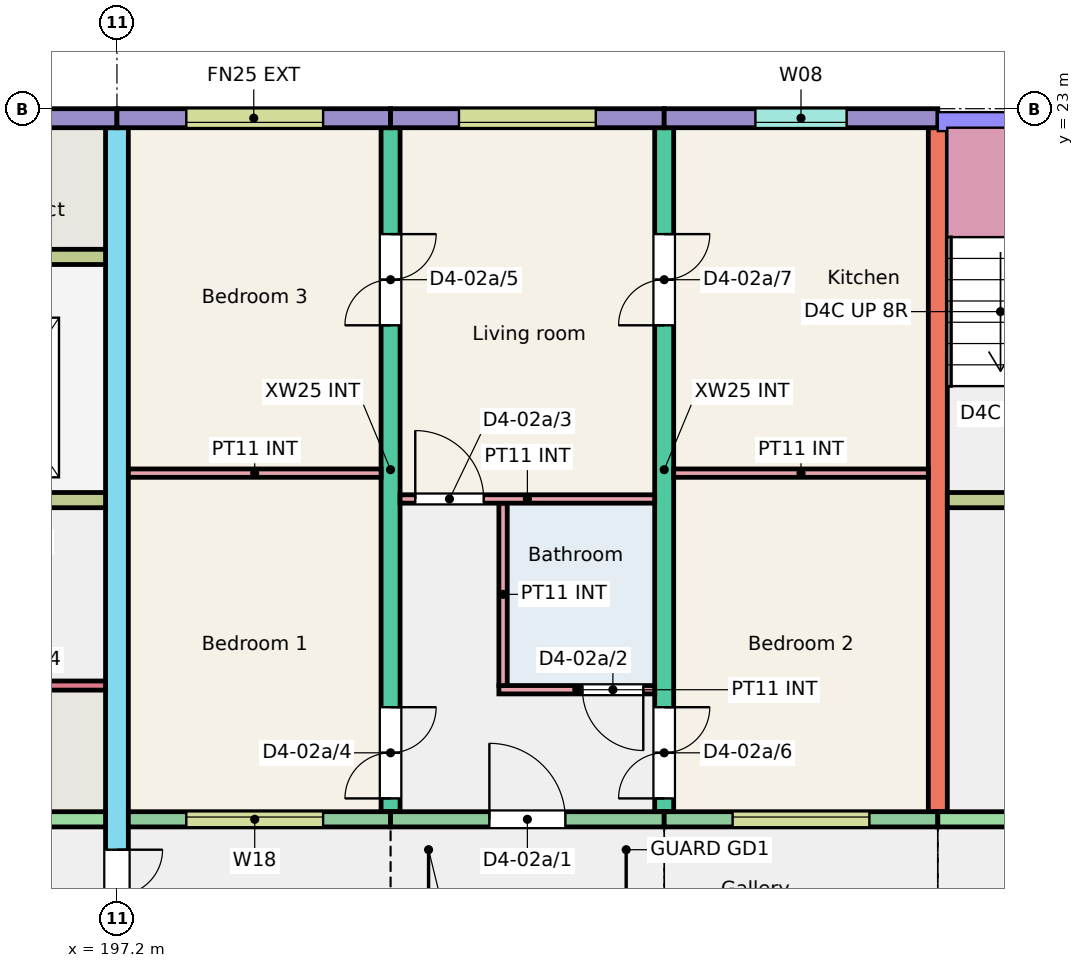
"""IFC4 building model, lengths in metres.
Left out: names, types, materials, properties, quantities, classifications, styles, units other than length and angle.
Written with IfcOpenShell. Run it as: python <this file> out.ifc"""

import sys

from ifc_helpers import new_model, si_unit, direction, frame, frame_2d, origin, place, context, subcontext, project, spatial, rectangle, extrude, element, fill, save


model = new_model("IFC4")
c1 = context("Model", 3, precision=1e-05, world=origin(), true_north=direction((0.0, 1.0)))
c2 = subcontext(c1, "Body", "Model", "MODEL_VIEW")
j1 = project(units=[si_unit("LENGTHUNIT", "METRE"), si_unit("PLANEANGLEUNIT", "RADIAN")], contexts=[c1])
p1 = place(None, origin())
s1 = spatial("IfcSite", under=j1, at=p1, CompositionType="ELEMENT")
p2 = place(p1, origin())
s2 = spatial("IfcBuilding", under=s1, at=p2, CompositionType="ELEMENT")
p3 = place(p2, frame((0.0, 0.0, 6.0)))
s3 = spatial("IfcBuildingStorey", under=s2, at=p3, CompositionType="ELEMENT", Elevation=6.0)
p4 = place(p3, frame((197.2, 11.75, 0.0), z_axis=(0.0, 0.0, 1.0), x_axis=(0.0, 1.0, 0.0)))
e1 = element("IfcWall", 1, at=p4, inside=s3, PredefinedType="SHEAR", context=c2, shape_type="SweptSolid", body=[
    extrude(rectangle(XDim=11.0, YDim=0.3, at=frame_2d((5.5, 0.0))), origin(), (0.0, 0.0, 1.0), 3.0),
])
p5 = place(p4, frame((0.3, 0.0, 0.0)))
e2 = element("IfcOpeningElement", 2, at=p5, cuts=e1, PredefinedType="OPENING", context=c2, shape_type="SweptSolid", body=[
    extrude(rectangle(XDim=1.2, YDim=2.1, at=frame_2d((0.6, 1.05))), frame((0.0, 0.16, 0.0), z_axis=(0.0, -1.0, 0.0), x_axis=(1.0, 0.0, 0.0)), (0.0, 0.0, 1.0), 0.32),
])
p6 = place(p3, frame((200.8, 13.75, 0.0), z_axis=(0.0, 0.0, 1.0), x_axis=(0.0, 1.0, 0.0)))
e3 = element("IfcWall", 3, at=p6, inside=s3, PredefinedType="SHEAR", context=c2, shape_type="SweptSolid", body=[
    extrude(rectangle(XDim=9.0, YDim=0.25, at=frame_2d((4.5, 0.0))), origin(), (0.0, 0.0, 1.0), 3.0),
])
p7 = place(p6, frame((0.175, 0.0, 0.0)))
e4 = element("IfcOpeningElement", 4, at=p7, cuts=e3, PredefinedType="OPENING", context=c2, shape_type="SweptSolid", body=[
    extrude(rectangle(XDim=1.2, YDim=2.1, at=frame_2d((0.6, 1.05))), frame((0.0, 0.135, 0.0), z_axis=(0.0, -1.0, 0.0), x_axis=(1.0, 0.0, 0.0)), (0.0, 0.0, 1.0), 0.27),
])
p8 = place(p6, frame((6.4, 0.0, 0.0)))
e5 = element("IfcOpeningElement", 5, at=p8, cuts=e3, PredefinedType="OPENING", context=c2, shape_type="SweptSolid", body=[
    extrude(rectangle(XDim=1.2, YDim=2.1, at=frame_2d((0.6, 1.05))), frame((0.0, 0.135, 0.0), z_axis=(0.0, -1.0, 0.0), x_axis=(1.0, 0.0, 0.0)), (0.0, 0.0, 1.0), 0.27),
])
p9 = place(p3, frame((204.4, 13.75, 0.0), z_axis=(0.0, 0.0, 1.0), x_axis=(0.0, 1.0, 0.0)))
e6 = element("IfcWall", 6, at=p9, inside=s3, PredefinedType="SHEAR", context=c2, shape_type="SweptSolid", body=[
    extrude(rectangle(XDim=9.0, YDim=0.25, at=frame_2d((4.5, 0.0))), origin(), (0.0, 0.0, 1.0), 3.0),
])
p10 = place(p9, frame((0.175, 0.0, 0.0)))
e7 = element("IfcOpeningElement", 7, at=p10, cuts=e6, PredefinedType="OPENING", context=c2, shape_type="SweptSolid", body=[
    extrude(rectangle(XDim=1.2, YDim=2.1, at=frame_2d((0.6, 1.05))), frame((0.0, 0.135, 0.0), z_axis=(0.0, -1.0, 0.0), x_axis=(1.0, 0.0, 0.0)), (0.0, 0.0, 1.0), 0.27),
])
p11 = place(p9, frame((6.4, 0.0, 0.0)))
e8 = element("IfcOpeningElement", 8, at=p11, cuts=e6, PredefinedType="OPENING", context=c2, shape_type="SweptSolid", body=[
    extrude(rectangle(XDim=1.2, YDim=2.1, at=frame_2d((0.6, 1.05))), frame((0.0, 0.135, 0.0), z_axis=(0.0, -1.0, 0.0), x_axis=(1.0, 0.0, 0.0)), (0.0, 0.0, 1.0), 0.27),
])
p12 = place(p3, frame((208.0, 13.75, 0.0), z_axis=(0.0, 0.0, 1.0), x_axis=(0.0, 1.0, 0.0)))
e9 = element("IfcWall", 9, at=p12, inside=s3, PredefinedType="SHEAR", context=c2, shape_type="SweptSolid", body=[
    extrude(rectangle(XDim=9.0, YDim=0.25, at=frame_2d((4.5, 0.0))), origin(), (0.0, 0.0, 1.0), 3.0),
])
p13 = place(p3, frame((194.225, 22.875, 0.0), z_axis=(0.0, 0.0, 1.0), x_axis=(1.0, 0.0, 0.0)))
e10 = element("IfcWall", 10, at=p13, inside=s3, PredefinedType="SOLIDWALL", context=c2, shape_type="SweptSolid", body=[
    extrude(rectangle(XDim=2.975, YDim=0.25, at=frame_2d((1.487, 0.0))), origin(), (0.0, 0.0, 1.0), 3.0),
])
p14 = place(p3, frame((191.2, 13.65, 0.0), z_axis=(0.0, 0.0, 1.0), x_axis=(1.0, 0.0, 0.0)))
e11 = element("IfcWall", 11, at=p14, inside=s3, PredefinedType="SHEAR", context=c2, shape_type="SweptSolid", body=[
    extrude(rectangle(XDim=5.85, YDim=0.2, at=frame_2d((2.925, 0.0))), origin(), (0.0, 0.0, 1.0), 3.0),
])
p15 = place(p14, frame((2.438, 0.0, 0.0)))
e12 = element("IfcOpeningElement", 12, at=p15, cuts=e11, PredefinedType="OPENING", context=c2, shape_type="SweptSolid", body=[
    extrude(rectangle(XDim=1.1, YDim=2.1, at=frame_2d((0.55, 1.05))), frame((0.0, 0.11, 0.0), z_axis=(0.0, -1.0, 0.0), x_axis=(1.0, 0.0, 0.0)), (0.0, 0.0, 1.0), 0.22),
])
p16 = place(p3, frame((191.325, 17.85, 0.0), z_axis=(0.0, 0.0, 1.0), x_axis=(1.0, 0.0, 0.0)))
e13 = element("IfcWall", 13, at=p16, inside=s3, PredefinedType="SHEAR", context=c2, shape_type="SweptSolid", body=[
    extrude(rectangle(XDim=5.725, YDim=0.2, at=frame_2d((2.863, 0.0))), origin(), (0.0, 0.0, 1.0), 3.0),
])
p17 = place(p16, frame((0.95, 0.0, 0.0)))
e14 = element("IfcOpeningElement", 14, at=p17, cuts=e13, PredefinedType="OPENING", context=c2, shape_type="SweptSolid", body=[
    extrude(rectangle(XDim=1.0, YDim=2.1, at=frame_2d((0.5, 1.05))), frame((0.0, 0.11, 0.0), z_axis=(0.0, -1.0, 0.0), x_axis=(1.0, 0.0, 0.0)), (0.0, 0.0, 1.0), 0.22),
])
p18 = place(p16, frame((3.863, 0.0, 0.0)))
e15 = element("IfcOpeningElement", 15, at=p18, cuts=e13, PredefinedType="OPENING", context=c2, shape_type="SweptSolid", body=[
    extrude(rectangle(XDim=1.1, YDim=2.1, at=frame_2d((0.55, 1.05))), frame((0.0, 0.11, 0.0), z_axis=(0.0, -1.0, 0.0), x_axis=(1.0, 0.0, 0.0)), (0.0, 0.0, 1.0), 0.22),
])
p19 = place(p3, frame((194.425, 21.05, 0.0), z_axis=(0.0, 0.0, 1.0), x_axis=(1.0, 0.0, 0.0)))
e16 = element("IfcWall", 16, at=p19, inside=s3, PredefinedType="SHEAR", context=c2, shape_type="SweptSolid", body=[
    extrude(rectangle(XDim=2.625, YDim=0.2, at=frame_2d((1.312, 0.0))), origin(), (0.0, 0.0, 1.0), 3.0),
])
p20 = place(p3, frame((195.92, 15.41, 0.0), z_axis=(0.0, 0.0, 1.0), x_axis=(1.0, 0.0, 0.0)))
e17 = element("IfcWall", 17, at=p20, inside=s3, PredefinedType="SHEAR", context=c2, shape_type="SweptSolid", body=[
    extrude(rectangle(XDim=1.13, YDim=0.12, at=frame_2d((0.565, 0.0))), origin(), (0.0, 0.0, 1.0), 3.0),
])
p21 = place(p3, frame((197.2, 22.875, 0.0), z_axis=(0.0, 0.0, 1.0), x_axis=(1.0, 0.0, 0.0)))
e18 = element("IfcWall", 18, at=p21, inside=s3, PredefinedType="SOLIDWALL", context=c2, shape_type="SweptSolid", body=[
    extrude(rectangle(XDim=3.6, YDim=0.25, at=frame_2d((1.8, 0.0))), origin(), (0.0, 0.0, 1.0), 3.0),
])
p22 = place(p21, frame((0.913, 0.0, 1.1)))
e19 = element("IfcOpeningElement", 19, at=p22, cuts=e18, PredefinedType="OPENING", context=c2, shape_type="SweptSolid", body=[
    extrude(rectangle(XDim=1.8, YDim=1.3, at=frame_2d((0.9, 0.65))), frame((0.0, 0.135, 0.0), z_axis=(0.0, -1.0, 0.0), x_axis=(1.0, 0.0, 0.0)), (0.0, 0.0, 1.0), 0.27),
])
p23 = place(p3, frame((197.35, 13.65, 0.0), z_axis=(0.0, 0.0, 1.0), x_axis=(1.0, 0.0, 0.0)))
e20 = element("IfcWall", 20, at=p23, inside=s3, PredefinedType="SOLIDWALL", context=c2, shape_type="SweptSolid", body=[
    extrude(rectangle(XDim=3.45, YDim=0.2, at=frame_2d((1.725, 0.0))), origin(), (0.0, 0.0, 1.0), 3.0),
])
p24 = place(p23, frame((0.762, 0.0, 1.1)))
e21 = element("IfcOpeningElement", 21, at=p24, cuts=e20, PredefinedType="OPENING", context=c2, shape_type="SweptSolid", body=[
    extrude(rectangle(XDim=1.8, YDim=1.3, at=frame_2d((0.9, 0.65))), frame((0.0, 0.11, 0.0), z_axis=(0.0, -1.0, 0.0), x_axis=(1.0, 0.0, 0.0)), (0.0, 0.0, 1.0), 0.22),
])
p25 = place(p3, frame((200.8, 22.875, 0.0), z_axis=(0.0, 0.0, 1.0), x_axis=(1.0, 0.0, 0.0)))
e22 = element("IfcWall", 22, at=p25, inside=s3, PredefinedType="SOLIDWALL", context=c2, shape_type="SweptSolid", body=[
    extrude(rectangle(XDim=3.6, YDim=0.25, at=frame_2d((1.8, 0.0))), origin(), (0.0, 0.0, 1.0), 3.0),
])
p26 = place(p25, frame((0.9, 0.0, 1.1)))
e23 = element("IfcOpeningElement", 23, at=p26, cuts=e22, PredefinedType="OPENING", context=c2, shape_type="SweptSolid", body=[
    extrude(rectangle(XDim=1.8, YDim=1.3, at=frame_2d((0.9, 0.65))), frame((0.0, 0.135, 0.0), z_axis=(0.0, -1.0, 0.0), x_axis=(1.0, 0.0, 0.0)), (0.0, 0.0, 1.0), 0.27),
])
p27 = place(p3, frame((200.8, 13.65, 0.0), z_axis=(0.0, 0.0, 1.0), x_axis=(1.0, 0.0, 0.0)))
e24 = element("IfcWall", 24, at=p27, inside=s3, PredefinedType="SOLIDWALL", context=c2, shape_type="SweptSolid", body=[
    extrude(rectangle(XDim=3.6, YDim=0.2, at=frame_2d((1.8, 0.0))), origin(), (0.0, 0.0, 1.0), 3.0),
])
p28 = place(p27, frame((1.3, 0.0, 0.0)))
e25 = element("IfcOpeningElement", 25, at=p28, cuts=e24, PredefinedType="OPENING", context=c2, shape_type="SweptSolid", body=[
    extrude(rectangle(XDim=1.0, YDim=2.1, at=frame_2d((0.5, 1.05))), frame((0.0, 0.11, 0.0), z_axis=(0.0, -1.0, 0.0), x_axis=(1.0, 0.0, 0.0)), (0.0, 0.0, 1.0), 0.22),
])
p29 = place(p3, frame((204.4, 22.875, 0.0), z_axis=(0.0, 0.0, 1.0), x_axis=(1.0, 0.0, 0.0)))
e26 = element("IfcWall", 26, at=p29, inside=s3, PredefinedType="SOLIDWALL", context=c2, shape_type="SweptSolid", body=[
    extrude(rectangle(XDim=3.6, YDim=0.25, at=frame_2d((1.8, 0.0))), origin(), (0.0, 0.0, 1.0), 3.0),
])
p30 = place(p29, frame((1.2, 0.0, 1.1)))
e27 = element("IfcOpeningElement", 27, at=p30, cuts=e26, PredefinedType="OPENING", context=c2, shape_type="SweptSolid", body=[
    extrude(rectangle(XDim=1.2, YDim=1.3, at=frame_2d((0.6, 0.65))), frame((0.0, 0.135, 0.0), z_axis=(0.0, -1.0, 0.0), x_axis=(1.0, 0.0, 0.0)), (0.0, 0.0, 1.0), 0.27),
])
p31 = place(p3, frame((204.4, 13.65, 0.0), z_axis=(0.0, 0.0, 1.0), x_axis=(1.0, 0.0, 0.0)))
e28 = element("IfcWall", 28, at=p31, inside=s3, PredefinedType="SOLIDWALL", context=c2, shape_type="SweptSolid", body=[
    extrude(rectangle(XDim=3.6, YDim=0.2, at=frame_2d((1.8, 0.0))), origin(), (0.0, 0.0, 1.0), 3.0),
])
p32 = place(p31, frame((0.9, 0.0, 1.1)))
e29 = element("IfcOpeningElement", 29, at=p32, cuts=e28, PredefinedType="OPENING", context=c2, shape_type="SweptSolid", body=[
    extrude(rectangle(XDim=1.8, YDim=1.3, at=frame_2d((0.9, 0.65))), frame((0.0, 0.11, 0.0), z_axis=(0.0, -1.0, 0.0), x_axis=(1.0, 0.0, 0.0)), (0.0, 0.0, 1.0), 0.22),
])
p33 = place(p3, frame((208.0, 13.65, 0.0), z_axis=(0.0, 0.0, 1.0), x_axis=(1.0, 0.0, 0.0)))
e30 = element("IfcWall", 30, at=p33, inside=s3, PredefinedType="SHEAR", context=c2, shape_type="SweptSolid", body=[
    extrude(rectangle(XDim=5.85, YDim=0.2, at=frame_2d((2.925, 0.0))), origin(), (0.0, 0.0, 1.0), 3.0),
])
p34 = place(p33, frame((2.438, 0.0, 0.0)))
e31 = element("IfcOpeningElement", 31, at=p34, cuts=e30, PredefinedType="OPENING", context=c2, shape_type="SweptSolid", body=[
    extrude(rectangle(XDim=1.1, YDim=2.1, at=frame_2d((0.55, 1.05))), frame((0.0, 0.11, 0.0), z_axis=(0.0, -1.0, 0.0), x_axis=(1.0, 0.0, 0.0)), (0.0, 0.0, 1.0), 0.22),
])
p35 = place(p3, frame((208.125, 17.85, 0.0), z_axis=(0.0, 0.0, 1.0), x_axis=(1.0, 0.0, 0.0)))
e32 = element("IfcWall", 32, at=p35, inside=s3, PredefinedType="SHEAR", context=c2, shape_type="SweptSolid", body=[
    extrude(rectangle(XDim=5.725, YDim=0.2, at=frame_2d((2.863, 0.0))), origin(), (0.0, 0.0, 1.0), 3.0),
])
p36 = place(p35, frame((0.95, 0.0, 0.0)))
e33 = element("IfcOpeningElement", 33, at=p36, cuts=e32, PredefinedType="OPENING", context=c2, shape_type="SweptSolid", body=[
    extrude(rectangle(XDim=1.0, YDim=2.1, at=frame_2d((0.5, 1.05))), frame((0.0, 0.11, 0.0), z_axis=(0.0, -1.0, 0.0), x_axis=(1.0, 0.0, 0.0)), (0.0, 0.0, 1.0), 0.22),
])
p37 = place(p35, frame((3.863, 0.0, 0.0)))
e34 = element("IfcOpeningElement", 34, at=p37, cuts=e32, PredefinedType="OPENING", context=c2, shape_type="SweptSolid", body=[
    extrude(rectangle(XDim=1.1, YDim=2.1, at=frame_2d((0.55, 1.05))), frame((0.0, 0.11, 0.0), z_axis=(0.0, -1.0, 0.0), x_axis=(1.0, 0.0, 0.0)), (0.0, 0.0, 1.0), 0.22),
])
p38 = place(p3, frame((202.225, 15.355, 0.0), z_axis=(0.0, 0.0, 1.0), x_axis=(1.0, 0.0, 0.0)))
e35 = element("IfcWall", 35, at=p38, inside=s3, PredefinedType="PARTITIONING", context=c2, shape_type="SweptSolid", body=[
    extrude(rectangle(XDim=2.05, YDim=0.11, at=frame_2d((1.025, 0.0))), origin(), (0.0, 0.0, 1.0), 2.8),
])
p39 = place(p38, frame((1.1, 0.0, 0.0)))
e36 = element("IfcOpeningElement", 36, at=p39, cuts=e35, PredefinedType="OPENING", context=c2, shape_type="SweptSolid", body=[
    extrude(rectangle(XDim=0.8, YDim=2.1, at=frame_2d((0.4, 1.05))), frame((0.0, 0.065, 0.0), z_axis=(0.0, -1.0, 0.0), x_axis=(1.0, 0.0, 0.0)), (0.0, 0.0, 1.0), 0.13),
])
p40 = place(p3, frame((202.28, 15.41, 0.0), z_axis=(0.0, 0.0, 1.0), x_axis=(0.0, 1.0, 0.0)))
e37 = element("IfcWall", 37, at=p40, inside=s3, PredefinedType="PARTITIONING", context=c2, shape_type="SweptSolid", body=[
    extrude(rectangle(XDim=2.4, YDim=0.11, at=frame_2d((1.2, 0.0))), origin(), (0.0, 0.0, 1.0), 2.8),
])
p41 = place(p3, frame((200.925, 17.865, 0.0), z_axis=(0.0, 0.0, 1.0), x_axis=(1.0, 0.0, 0.0)))
e38 = element("IfcWall", 38, at=p41, inside=s3, PredefinedType="PARTITIONING", context=c2, shape_type="SweptSolid", body=[
    extrude(rectangle(XDim=3.35, YDim=0.11, at=frame_2d((1.675, 0.0))), origin(), (0.0, 0.0, 1.0), 2.8),
])
p42 = place(p41, frame((0.2, 0.0, 0.0)))
e39 = element("IfcOpeningElement", 39, at=p42, cuts=e38, PredefinedType="OPENING", context=c2, shape_type="SweptSolid", body=[
    extrude(rectangle(XDim=0.9, YDim=2.1, at=frame_2d((0.45, 1.05))), frame((0.0, 0.065, 0.0), z_axis=(0.0, -1.0, 0.0), x_axis=(1.0, 0.0, 0.0)), (0.0, 0.0, 1.0), 0.13),
])
p43 = place(p3, frame((197.35, 18.205, 0.0), z_axis=(0.0, 0.0, 1.0), x_axis=(1.0, 0.0, 0.0)))
e40 = element("IfcWall", 40, at=p43, inside=s3, PredefinedType="PARTITIONING", context=c2, shape_type="SweptSolid", body=[
    extrude(rectangle(XDim=3.325, YDim=0.11, at=frame_2d((1.663, 0.0))), origin(), (0.0, 0.0, 1.0), 2.8),
])
p44 = place(p3, frame((204.525, 18.205, 0.0), z_axis=(0.0, 0.0, 1.0), x_axis=(1.0, 0.0, 0.0)))
e41 = element("IfcWall", 41, at=p44, inside=s3, PredefinedType="PARTITIONING", context=c2, shape_type="SweptSolid", body=[
    extrude(rectangle(XDim=3.35, YDim=0.11, at=frame_2d((1.675, 0.0))), origin(), (0.0, 0.0, 1.0), 2.8),
])
p45 = place(p24, origin())
e42 = element("IfcWindow", 42, at=p45, inside=s3, PartitioningType="SINGLE_PANEL", PredefinedType="WINDOW", context=c2, shape_type="SweptSolid", body=[
    extrude(rectangle(XDim=1.8, YDim=1.3, at=frame_2d((0.9, 0.65))), frame((0.0, 0.06, 0.0), z_axis=(0.0, -1.0, 0.0), x_axis=(1.0, 0.0, 0.0)), (0.0, 0.0, 1.0), 0.06),
])
fill(e21, e42)
p46 = place(p22, origin())
e43 = element("IfcWindow", 43, at=p46, inside=s3, PartitioningType="SINGLE_PANEL", PredefinedType="WINDOW", context=c2, shape_type="SweptSolid", body=[
    extrude(rectangle(XDim=1.8, YDim=1.3, at=frame_2d((0.9, 0.65))), frame((0.0, -0.025, 0.0), z_axis=(0.0, -1.0, 0.0), x_axis=(1.0, 0.0, 0.0)), (0.0, 0.0, 1.0), 0.06),
])
fill(e19, e43)
p47 = place(p32, origin())
e44 = element("IfcWindow", 44, at=p47, inside=s3, PartitioningType="SINGLE_PANEL", PredefinedType="WINDOW", context=c2, shape_type="SweptSolid", body=[
    extrude(rectangle(XDim=1.8, YDim=1.3, at=frame_2d((0.9, 0.65))), frame((0.0, 0.06, 0.0), z_axis=(0.0, -1.0, 0.0), x_axis=(1.0, 0.0, 0.0)), (0.0, 0.0, 1.0), 0.06),
])
fill(e29, e44)
p48 = place(p30, origin())
e45 = element("IfcWindow", 45, at=p48, inside=s3, PartitioningType="SINGLE_PANEL", PredefinedType="WINDOW", context=c2, shape_type="SweptSolid", body=[
    extrude(rectangle(XDim=1.2, YDim=1.3, at=frame_2d((0.6, 0.65))), frame((0.0, -0.025, 0.0), z_axis=(0.0, -1.0, 0.0), x_axis=(1.0, 0.0, 0.0)), (0.0, 0.0, 1.0), 0.06),
])
fill(e27, e45)
p49 = place(p26, origin())
e46 = element("IfcWindow", 46, at=p49, inside=s3, PartitioningType="SINGLE_PANEL", PredefinedType="WINDOW", context=c2, shape_type="SweptSolid", body=[
    extrude(rectangle(XDim=1.8, YDim=1.3, at=frame_2d((0.9, 0.65))), frame((0.0, -0.025, 0.0), z_axis=(0.0, -1.0, 0.0), x_axis=(1.0, 0.0, 0.0)), (0.0, 0.0, 1.0), 0.06),
])
fill(e23, e46)
p50 = place(p28, origin())
e47 = element("IfcDoor", 47, at=p50, inside=s3, OperationType="SINGLE_SWING_LEFT", PredefinedType="DOOR", context=c2, shape_type="SweptSolid", body=[
    extrude(rectangle(XDim=1.0, YDim=2.1, at=frame_2d((0.5, 1.05))), frame((0.0, 0.025, 0.0), z_axis=(0.0, -1.0, 0.0), x_axis=(1.0, 0.0, 0.0)), (0.0, 0.0, 1.0), 0.05),
])
fill(e25, e47)
p51 = place(p39, origin())
e48 = element("IfcDoor", 48, at=p51, inside=s3, OperationType="SINGLE_SWING_RIGHT", PredefinedType="DOOR", context=c2, shape_type="SweptSolid", body=[
    extrude(rectangle(XDim=0.8, YDim=2.1, at=frame_2d((0.4, 1.05))), frame((0.0, 0.025, 0.0), z_axis=(0.0, -1.0, 0.0), x_axis=(1.0, 0.0, 0.0)), (0.0, 0.0, 1.0), 0.05),
])
fill(e36, e48)
p52 = place(p42, origin())
e49 = element("IfcDoor", 49, at=p52, inside=s3, OperationType="SINGLE_SWING_LEFT", PredefinedType="DOOR", context=c2, shape_type="SweptSolid", body=[
    extrude(rectangle(XDim=0.9, YDim=2.1, at=frame_2d((0.45, 1.05))), frame((0.0, 0.025, 0.0), z_axis=(0.0, -1.0, 0.0), x_axis=(1.0, 0.0, 0.0)), (0.0, 0.0, 1.0), 0.05),
])
fill(e39, e49)
p53 = place(p7, origin())
e50 = element("IfcDoor", 50, at=p53, inside=s3, OperationType="DOUBLE_DOOR_SINGLE_SWING", PredefinedType="DOOR", context=c2, shape_type="SweptSolid", body=[
    extrude(rectangle(XDim=1.2, YDim=2.1, at=frame_2d((0.6, 1.05))), frame((0.0, 0.025, 0.0), z_axis=(0.0, -1.0, 0.0), x_axis=(1.0, 0.0, 0.0)), (0.0, 0.0, 1.0), 0.05),
])
fill(e4, e50)
p54 = place(p8, origin())
e51 = element("IfcDoor", 51, at=p54, inside=s3, OperationType="DOUBLE_DOOR_SINGLE_SWING", PredefinedType="DOOR", context=c2, shape_type="SweptSolid", body=[
    extrude(rectangle(XDim=1.2, YDim=2.1, at=frame_2d((0.6, 1.05))), frame((0.0, 0.025, 0.0), z_axis=(0.0, -1.0, 0.0), x_axis=(1.0, 0.0, 0.0)), (0.0, 0.0, 1.0), 0.05),
])
fill(e5, e51)
p55 = place(p10, origin())
e52 = element("IfcDoor", 52, at=p55, inside=s3, OperationType="DOUBLE_DOOR_SINGLE_SWING", PredefinedType="DOOR", context=c2, shape_type="SweptSolid", body=[
    extrude(rectangle(XDim=1.2, YDim=2.1, at=frame_2d((0.6, 1.05))), frame((0.0, 0.025, 0.0), z_axis=(0.0, -1.0, 0.0), x_axis=(1.0, 0.0, 0.0)), (0.0, 0.0, 1.0), 0.05),
])
fill(e7, e52)
p56 = place(p11, origin())
e53 = element("IfcDoor", 53, at=p56, inside=s3, OperationType="DOUBLE_DOOR_SINGLE_SWING", PredefinedType="DOOR", context=c2, shape_type="SweptSolid", body=[
    extrude(rectangle(XDim=1.2, YDim=2.1, at=frame_2d((0.6, 1.05))), frame((0.0, 0.025, 0.0), z_axis=(0.0, -1.0, 0.0), x_axis=(1.0, 0.0, 0.0)), (0.0, 0.0, 1.0), 0.05),
])
fill(e8, e53)
p57 = place(p5, origin())
e54 = element("IfcDoor", 54, at=p57, inside=s3, OperationType="DOUBLE_DOOR_SINGLE_SWING", PredefinedType="DOOR", context=c2, shape_type="SweptSolid", body=[
    extrude(rectangle(XDim=1.2, YDim=2.1, at=frame_2d((0.6, 1.05))), frame((0.0, 0.025, 0.0), z_axis=(0.0, -1.0, 0.0), x_axis=(1.0, 0.0, 0.0)), (0.0, 0.0, 1.0), 0.05),
])
fill(e2, e54)
save(model, sys.argv[1])
